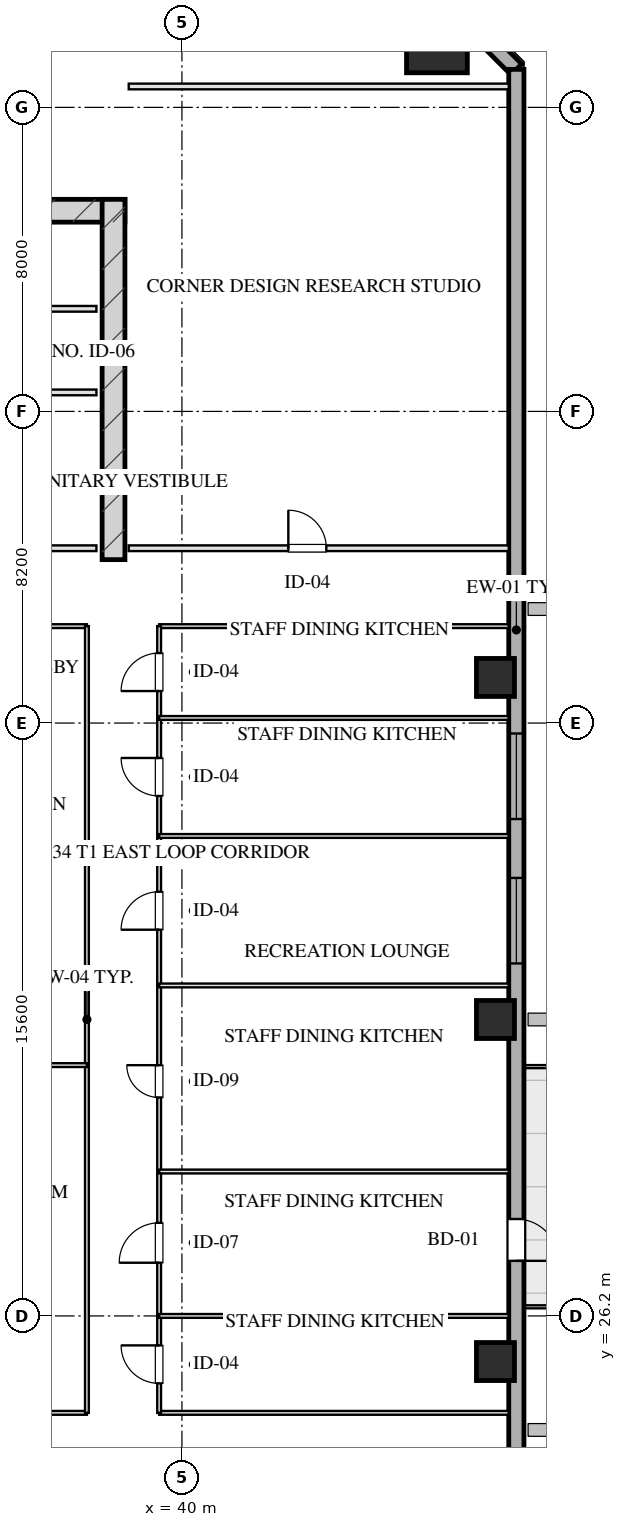
"""IFC4 building model, lengths in metres.
Left out: names, types, materials, properties, quantities, classifications, styles, units other than length and angle.
Written with IfcOpenShell. Run it as: python <this file> out.ifc"""

import sys

from ifc_helpers import new_model, si_unit, direction, frame, frame_2d, origin, origin_2d, place, context, subcontext, project, spatial, rectangle, hollow_rectangle, extrude, element, fill, save


model = new_model("IFC4")
c1 = context("Model", 3, precision=1e-05, world=origin(), true_north=direction((0.0, 1.0)))
c2 = subcontext(c1, "Body", "Model", "MODEL_VIEW")
j1 = project(units=[si_unit("LENGTHUNIT", "METRE"), si_unit("PLANEANGLEUNIT", "RADIAN")], contexts=[c1])
p1 = place(None, origin())
s1 = spatial("IfcSite", under=j1, at=p1, CompositionType="ELEMENT")
p2 = place(p1, origin())
s2 = spatial("IfcBuilding", under=s1, at=p2, CompositionType="ELEMENT")
p3 = place(p2, frame((0.0, 0.0, 131.1)))
s3 = spatial("IfcBuildingStorey", under=s2, at=p3, CompositionType="ELEMENT", Elevation=131.1)
p4 = place(p3, frame((21.5, 55.28, 0.0), z_axis=(0.0, 0.0, 1.0), x_axis=(1.0, 0.0, 0.0)))
e1 = element("IfcWall", 1, at=p4, inside=s3, PredefinedType="SHEAR", context=c2, shape_type="SweptSolid", body=[
    extrude(rectangle(XDim=17.0, YDim=0.6, at=frame_2d((8.5, 0.0))), origin(), (0.0, 0.0, 1.0), 3.45),
])
p5 = place(p3, frame((38.2, 46.1, 0.0), z_axis=(0.0, 0.0, 1.0), x_axis=(0.0, 1.0, 0.0)))
e2 = element("IfcWall", 2, at=p5, inside=s3, PredefinedType="SHEAR", context=c2, shape_type="SweptSolid", body=[
    extrude(rectangle(XDim=9.48, YDim=0.6, at=frame_2d((4.74, 0.0))), origin(), (0.0, 0.0, 1.0), 3.45),
])
p6 = place(p3, frame((46.71, 59.71, 0.0), z_axis=(0.0, 0.0, 1.0), x_axis=(1.0, 0.0, 0.0)))
e3 = element("IfcColumn", 3, at=p6, inside=s3, PredefinedType="COLUMN", context=c2, shape_type="SweptSolid", body=[
    extrude(hollow_rectangle(XDim=1.6, YDim=1.6, WallThickness=0.055, at=origin_2d()), origin(), (0.0, 0.0, 1.0), 3.451),
])
for number, where, z_axis, x_axis in (
    (4, (48.25, 25.0, 0.0), (0.0, 0.0, 1.0), (1.0, 0.0, 0.0)),
    (5, (48.25, 34.0, 0.0), (0.0, 0.0, 1.0), (1.0, 0.0, 0.0)),
    (6, (48.25, 43.0, 0.0), (0.0, 0.0, 1.0), (1.0, 0.0, 0.0)),
):
    element("IfcColumn", number, at=place(p3, frame(where, z_axis=z_axis, x_axis=x_axis)), inside=s3, PredefinedType="COLUMN", context=c2, shape_type="SweptSolid", body=[
        extrude(hollow_rectangle(XDim=1.0, YDim=1.0, WallThickness=0.036, at=origin_2d()), origin(), (0.0, 0.0, 1.0), 3.451),
    ])
p7 = place(p3, frame((46.0, 61.8, 0.0), z_axis=(0.0, 0.0, 1.0), x_axis=(0.707106781187, -0.707106781187, 0.0)))
e7 = element("IfcWall", 7, at=p7, inside=s3, PredefinedType="SOLIDWALL", context=c2, shape_type="SweptSolid", body=[
    extrude(rectangle(XDim=3.96, YDim=0.4, at=frame_2d((1.98, 0.0))), origin(), (0.0, 0.0, 1.0), 2.61),
])
p8 = place(p3, frame((48.8, 59.0, 0.0), z_axis=(0.0, 0.0, 1.0), x_axis=(0.0, -1.0, 0.0)))
e8 = element("IfcWall", 8, at=p8, inside=s3, PredefinedType="SOLIDWALL", context=c2, shape_type="SweptSolid", body=[
    extrude(rectangle(XDim=50.0, YDim=0.4, at=frame_2d((25.0, 0.0))), origin(), (0.0, 0.0, 1.0), 2.61),
])
p9 = place(p8, frame((21.275, 0.0, 0.75)))
e9 = element("IfcOpeningElement", 9, at=p9, cuts=e8, PredefinedType="OPENING", context=c2, shape_type="SweptSolid", body=[
    extrude(rectangle(XDim=2.25, YDim=1.46, at=frame_2d((1.125, 0.73))), frame((0.0, 0.21, 0.0), z_axis=(0.0, -1.0, 0.0), x_axis=(1.0, 0.0, 0.0)), (0.0, 0.0, 1.0), 0.42),
])
p10 = place(p8, frame((17.475, 0.0, 0.75)))
e10 = element("IfcOpeningElement", 10, at=p10, cuts=e8, PredefinedType="OPENING", context=c2, shape_type="SweptSolid", body=[
    extrude(rectangle(XDim=2.25, YDim=1.46, at=frame_2d((1.125, 0.73))), frame((0.0, 0.21, 0.0), z_axis=(0.0, -1.0, 0.0), x_axis=(1.0, 0.0, 0.0)), (0.0, 0.0, 1.0), 0.42),
])
p11 = place(p8, frame((30.25, 0.0, 0.0)))
e11 = element("IfcOpeningElement", 11, at=p11, cuts=e8, PredefinedType="OPENING", context=c2, shape_type="SweptSolid", body=[
    extrude(rectangle(XDim=1.1, YDim=2.15, at=frame_2d((0.55, 1.075))), frame((0.0, 0.21, 0.0), z_axis=(0.0, -1.0, 0.0), x_axis=(1.0, 0.0, 0.0)), (0.0, 0.0, 1.0), 0.42),
])
p12 = place(p3, frame((33.95, 46.4, 0.0), z_axis=(0.0, 0.0, 1.0), x_axis=(1.0, 0.0, 0.0)))
e12 = element("IfcWall", 12, at=p12, inside=s3, PredefinedType="PARTITIONING", context=c2, shape_type="SweptSolid", body=[
    extrude(rectangle(XDim=3.8, YDim=0.15, at=frame_2d((1.9, 0.0))), origin(), (0.0, 0.0, 1.0), 3.175),
])
p13 = place(p12, frame((0.22, 0.0, 0.0)))
e13 = element("IfcOpeningElement", 13, at=p13, cuts=e12, PredefinedType="OPENING", context=c2, shape_type="SweptSolid", body=[
    extrude(rectangle(XDim=0.95, YDim=2.05, at=frame_2d((0.475, 1.025))), frame((0.0, 0.085, 0.0), z_axis=(0.0, -1.0, 0.0), x_axis=(1.0, 0.0, 0.0)), (0.0, 0.0, 1.0), 0.17),
])
for number, where, z_axis, x_axis in (
    (14, (35.45, 50.5, 0.0), (0.0, 0.0, 1.0), (1.0, 0.0, 0.0)),
    (15, (35.45, 52.7, 0.0), (0.0, 0.0, 1.0), (1.0, 0.0, 0.0)),
):
    element("IfcWall", number, at=place(p3, frame(where, z_axis=z_axis, x_axis=x_axis)), inside=s3, PredefinedType="PARTITIONING", context=c2, shape_type="SweptSolid", body=[
        extrude(rectangle(XDim=2.3, YDim=0.15, at=frame_2d((1.15, 0.0))), origin(), (0.0, 0.0, 1.0), 3.175),
    ])
p14 = place(p3, frame((38.6, 58.55, 0.0), z_axis=(0.0, 0.0, 1.0), x_axis=(1.0, 0.0, 0.0)))
e16 = element("IfcWall", 16, at=p14, inside=s3, PredefinedType="PARTITIONING", context=c2, shape_type="SweptSolid", body=[
    extrude(rectangle(XDim=10.0, YDim=0.15, at=frame_2d((5.0, 0.0))), origin(), (0.0, 0.0, 1.0), 3.175),
])
p15 = place(p3, frame((38.6, 46.4, 0.0), z_axis=(0.0, 0.0, 1.0), x_axis=(1.0, 0.0, 0.0)))
e17 = element("IfcWall", 17, at=p15, inside=s3, PredefinedType="PARTITIONING", context=c2, shape_type="SweptSolid", body=[
    extrude(rectangle(XDim=10.0, YDim=0.15, at=frame_2d((5.0, 0.0))), origin(), (0.0, 0.0, 1.0), 3.175),
])
p16 = place(p15, frame((4.2, 0.0, 0.0)))
e18 = element("IfcOpeningElement", 18, at=p16, cuts=e17, PredefinedType="OPENING", context=c2, shape_type="SweptSolid", body=[
    extrude(rectangle(XDim=1.0, YDim=2.05, at=frame_2d((0.5, 1.025))), frame((0.0, 0.085, 0.0), z_axis=(0.0, -1.0, 0.0), x_axis=(1.0, 0.0, 0.0)), (0.0, 0.0, 1.0), 0.17),
])
p17 = place(p3, frame((28.3, 23.65, 0.0), z_axis=(0.0, 0.0, 1.0), x_axis=(1.0, 0.0, 0.0)))
e19 = element("IfcWall", 19, at=p17, inside=s3, PredefinedType="MOVABLE", context=c2, shape_type="SweptSolid", body=[
    extrude(rectangle(XDim=9.2, YDim=0.1, at=frame_2d((4.6, 0.0))), origin(), (0.0, 0.0, 1.0), 3.175),
])
p18 = place(p3, frame((39.4, 23.65, 0.0), z_axis=(0.0, 0.0, 1.0), x_axis=(1.0, 0.0, 0.0)))
e20 = element("IfcWall", 20, at=p18, inside=s3, PredefinedType="MOVABLE", context=c2, shape_type="SweptSolid", body=[
    extrude(rectangle(XDim=9.2, YDim=0.1, at=frame_2d((4.6, 0.0))), origin(), (0.0, 0.0, 1.0), 3.175),
])
p19 = place(p3, frame((28.3, 44.35, 0.0), z_axis=(0.0, 0.0, 1.0), x_axis=(1.0, 0.0, 0.0)))
e21 = element("IfcWall", 21, at=p19, inside=s3, PredefinedType="MOVABLE", context=c2, shape_type="SweptSolid", body=[
    extrude(rectangle(XDim=9.2, YDim=0.1, at=frame_2d((4.6, 0.0))), origin(), (0.0, 0.0, 1.0), 3.175),
])
p20 = place(p3, frame((39.4, 44.35, 0.0), z_axis=(0.0, 0.0, 1.0), x_axis=(1.0, 0.0, 0.0)))
e22 = element("IfcWall", 22, at=p20, inside=s3, PredefinedType="MOVABLE", context=c2, shape_type="SweptSolid", body=[
    extrude(rectangle(XDim=9.2, YDim=0.1, at=frame_2d((4.6, 0.0))), origin(), (0.0, 0.0, 1.0), 3.175),
])
p21 = place(p3, frame((37.5, 23.65, 0.0), z_axis=(0.0, 0.0, 1.0), x_axis=(0.0, 1.0, 0.0)))
e23 = element("IfcWall", 23, at=p21, inside=s3, PredefinedType="MOVABLE", context=c2, shape_type="SweptSolid", body=[
    extrude(rectangle(XDim=20.7, YDim=0.1, at=frame_2d((10.35, 0.0))), origin(), (0.0, 0.0, 1.0), 3.175),
])
p22 = place(p3, frame((39.4, 23.65, 0.0), z_axis=(0.0, 0.0, 1.0), x_axis=(0.0, 1.0, 0.0)))
e24 = element("IfcWall", 24, at=p22, inside=s3, PredefinedType="MOVABLE", context=c2, shape_type="SweptSolid", body=[
    extrude(rectangle(XDim=20.7, YDim=0.1, at=frame_2d((10.35, 0.0))), origin(), (0.0, 0.0, 1.0), 3.175),
])
p23 = place(p22, frame((0.775, 0.0, 0.0)))
e25 = element("IfcOpeningElement", 25, at=p23, cuts=e24, PredefinedType="OPENING", context=c2, shape_type="SweptSolid", body=[
    extrude(rectangle(XDim=1.0, YDim=2.05, at=frame_2d((0.5, 1.025))), frame((0.0, 0.06, 0.0), z_axis=(0.0, -1.0, 0.0), x_axis=(1.0, 0.0, 0.0)), (0.0, 0.0, 1.0), 0.12),
])
p24 = place(p22, frame((3.95, 0.0, 0.0)))
e26 = element("IfcOpeningElement", 26, at=p24, cuts=e24, PredefinedType="OPENING", context=c2, shape_type="SweptSolid", body=[
    extrude(rectangle(XDim=1.05, YDim=2.05, at=frame_2d((0.525, 1.025))), frame((0.0, 0.06, 0.0), z_axis=(0.0, -1.0, 0.0), x_axis=(1.0, 0.0, 0.0)), (0.0, 0.0, 1.0), 0.12),
])
p25 = place(p22, frame((8.298, 0.0, 0.0)))
e27 = element("IfcOpeningElement", 27, at=p25, cuts=e24, PredefinedType="OPENING", context=c2, shape_type="SweptSolid", body=[
    extrude(rectangle(XDim=0.85, YDim=2.05, at=frame_2d((0.425, 1.025))), frame((0.0, 0.06, 0.0), z_axis=(0.0, -1.0, 0.0), x_axis=(1.0, 0.0, 0.0)), (0.0, 0.0, 1.0), 0.12),
])
p26 = place(p22, frame((12.712, 0.0, 0.0)))
e28 = element("IfcOpeningElement", 28, at=p26, cuts=e24, PredefinedType="OPENING", context=c2, shape_type="SweptSolid", body=[
    extrude(rectangle(XDim=1.0, YDim=2.05, at=frame_2d((0.5, 1.025))), frame((0.0, 0.06, 0.0), z_axis=(0.0, -1.0, 0.0), x_axis=(1.0, 0.0, 0.0)), (0.0, 0.0, 1.0), 0.12),
])
p27 = place(p22, frame((16.231, 0.0, 0.0)))
e29 = element("IfcOpeningElement", 29, at=p27, cuts=e24, PredefinedType="OPENING", context=c2, shape_type="SweptSolid", body=[
    extrude(rectangle(XDim=1.0, YDim=2.05, at=frame_2d((0.5, 1.025))), frame((0.0, 0.06, 0.0), z_axis=(0.0, -1.0, 0.0), x_axis=(1.0, 0.0, 0.0)), (0.0, 0.0, 1.0), 0.12),
])
p28 = place(p22, frame((18.992, 0.0, 0.0)))
e30 = element("IfcOpeningElement", 30, at=p28, cuts=e24, PredefinedType="OPENING", context=c2, shape_type="SweptSolid", body=[
    extrude(rectangle(XDim=1.0, YDim=2.05, at=frame_2d((0.5, 1.025))), frame((0.0, 0.06, 0.0), z_axis=(0.0, -1.0, 0.0), x_axis=(1.0, 0.0, 0.0)), (0.0, 0.0, 1.0), 0.12),
])
p29 = place(p3, frame((28.3, 32.8, 0.0), z_axis=(0.0, 0.0, 1.0), x_axis=(1.0, 0.0, 0.0)))
e31 = element("IfcWall", 31, at=p29, inside=s3, PredefinedType="MOVABLE", context=c2, shape_type="SweptSolid", body=[
    extrude(rectangle(XDim=9.2, YDim=0.1, at=frame_2d((4.6, 0.0))), origin(), (0.0, 0.0, 1.0), 3.175),
])
for number, where, z_axis, x_axis in (
    (32, (39.4, 26.2, 0.0), (0.0, 0.0, 1.0), (1.0, 0.0, 0.0)),
    (33, (39.4, 30.0, 0.0), (0.0, 0.0, 1.0), (1.0, 0.0, 0.0)),
    (34, (39.4, 34.896, 0.0), (0.0, 0.0, 1.0), (1.0, 0.0, 0.0)),
    (35, (39.4, 38.829, 0.0), (0.0, 0.0, 1.0), (1.0, 0.0, 0.0)),
    (36, (39.4, 41.934, 0.0), (0.0, 0.0, 1.0), (1.0, 0.0, 0.0)),
):
    element("IfcWall", number, at=place(p3, frame(where, z_axis=z_axis, x_axis=x_axis)), inside=s3, PredefinedType="MOVABLE", context=c2, shape_type="SweptSolid", body=[
        extrude(rectangle(XDim=9.2, YDim=0.1, at=frame_2d((4.6, 0.0))), origin(), (0.0, 0.0, 1.0), 3.175),
    ])
p30 = place(p9, origin())
e37 = element("IfcWindow", 37, at=p30, inside=s3, PartitioningType="TRIPLE_PANEL_VERTICAL", PredefinedType="WINDOW", context=c2, shape_type="SweptSolid", body=[
    extrude(rectangle(XDim=2.25, YDim=1.46, at=frame_2d((1.125, 0.73))), frame((0.0, 0.03, 0.0), z_axis=(0.0, -1.0, 0.0), x_axis=(1.0, 0.0, 0.0)), (0.0, 0.0, 1.0), 0.06),
])
fill(e9, e37)
p31 = place(p10, origin())
e38 = element("IfcWindow", 38, at=p31, inside=s3, PartitioningType="TRIPLE_PANEL_VERTICAL", PredefinedType="WINDOW", context=c2, shape_type="SweptSolid", body=[
    extrude(rectangle(XDim=2.25, YDim=1.46, at=frame_2d((1.125, 0.73))), frame((0.0, 0.03, 0.0), z_axis=(0.0, -1.0, 0.0), x_axis=(1.0, 0.0, 0.0)), (0.0, 0.0, 1.0), 0.06),
])
fill(e10, e38)
p32 = place(p11, origin())
e39 = element("IfcDoor", 39, at=p32, inside=s3, OperationType="SINGLE_SWING_RIGHT", PredefinedType="DOOR", context=c2, shape_type="SweptSolid", body=[
    extrude(rectangle(XDim=1.1, YDim=2.15, at=frame_2d((0.55, 1.075))), frame((0.0, 0.025, 0.0), z_axis=(0.0, -1.0, 0.0), x_axis=(1.0, 0.0, 0.0)), (0.0, 0.0, 1.0), 0.05),
])
fill(e11, e39)
p33 = place(p16, origin())
e40 = element("IfcDoor", 40, at=p33, inside=s3, OperationType="SINGLE_SWING_LEFT", PredefinedType="DOOR", context=c2, shape_type="SweptSolid", body=[
    extrude(rectangle(XDim=1.0, YDim=2.05, at=frame_2d((0.5, 1.025))), frame((0.0, 0.025, 0.0), z_axis=(0.0, -1.0, 0.0), x_axis=(1.0, 0.0, 0.0)), (0.0, 0.0, 1.0), 0.05),
])
fill(e18, e40)
p34 = place(p23, origin())
e41 = element("IfcDoor", 41, at=p34, inside=s3, OperationType="SINGLE_SWING_RIGHT", PredefinedType="DOOR", context=c2, shape_type="SweptSolid", body=[
    extrude(rectangle(XDim=1.0, YDim=2.05, at=frame_2d((0.5, 1.025))), frame((0.0, 0.025, 0.0), z_axis=(0.0, -1.0, 0.0), x_axis=(1.0, 0.0, 0.0)), (0.0, 0.0, 1.0), 0.05),
])
fill(e25, e41)
p35 = place(p24, origin())
e42 = element("IfcDoor", 42, at=p35, inside=s3, OperationType="SINGLE_SWING_LEFT", PredefinedType="DOOR", context=c2, shape_type="SweptSolid", body=[
    extrude(rectangle(XDim=1.05, YDim=2.05, at=frame_2d((0.525, 1.025))), frame((0.0, 0.025, 0.0), z_axis=(0.0, -1.0, 0.0), x_axis=(1.0, 0.0, 0.0)), (0.0, 0.0, 1.0), 0.05),
])
fill(e26, e42)
p36 = place(p25, origin())
e43 = element("IfcDoor", 43, at=p36, inside=s3, OperationType="SINGLE_SWING_RIGHT", PredefinedType="DOOR", context=c2, shape_type="SweptSolid", body=[
    extrude(rectangle(XDim=0.85, YDim=2.05, at=frame_2d((0.425, 1.025))), frame((0.0, 0.025, 0.0), z_axis=(0.0, -1.0, 0.0), x_axis=(1.0, 0.0, 0.0)), (0.0, 0.0, 1.0), 0.05),
])
fill(e27, e43)
p37 = place(p26, origin())
e44 = element("IfcDoor", 44, at=p37, inside=s3, OperationType="SINGLE_SWING_LEFT", PredefinedType="DOOR", context=c2, shape_type="SweptSolid", body=[
    extrude(rectangle(XDim=1.0, YDim=2.05, at=frame_2d((0.5, 1.025))), frame((0.0, 0.025, 0.0), z_axis=(0.0, -1.0, 0.0), x_axis=(1.0, 0.0, 0.0)), (0.0, 0.0, 1.0), 0.05),
])
fill(e28, e44)
p38 = place(p27, origin())
e45 = element("IfcDoor", 45, at=p38, inside=s3, OperationType="SINGLE_SWING_RIGHT", PredefinedType="DOOR", context=c2, shape_type="SweptSolid", body=[
    extrude(rectangle(XDim=1.0, YDim=2.05, at=frame_2d((0.5, 1.025))), frame((0.0, 0.025, 0.0), z_axis=(0.0, -1.0, 0.0), x_axis=(1.0, 0.0, 0.0)), (0.0, 0.0, 1.0), 0.05),
])
fill(e29, e45)
p39 = place(p28, origin())
e46 = element("IfcDoor", 46, at=p39, inside=s3, OperationType="SINGLE_SWING_LEFT", PredefinedType="DOOR", context=c2, shape_type="SweptSolid", body=[
    extrude(rectangle(XDim=1.0, YDim=2.05, at=frame_2d((0.5, 1.025))), frame((0.0, 0.025, 0.0), z_axis=(0.0, -1.0, 0.0), x_axis=(1.0, 0.0, 0.0)), (0.0, 0.0, 1.0), 0.05),
])
fill(e30, e46)
save(model, sys.argv[1])
